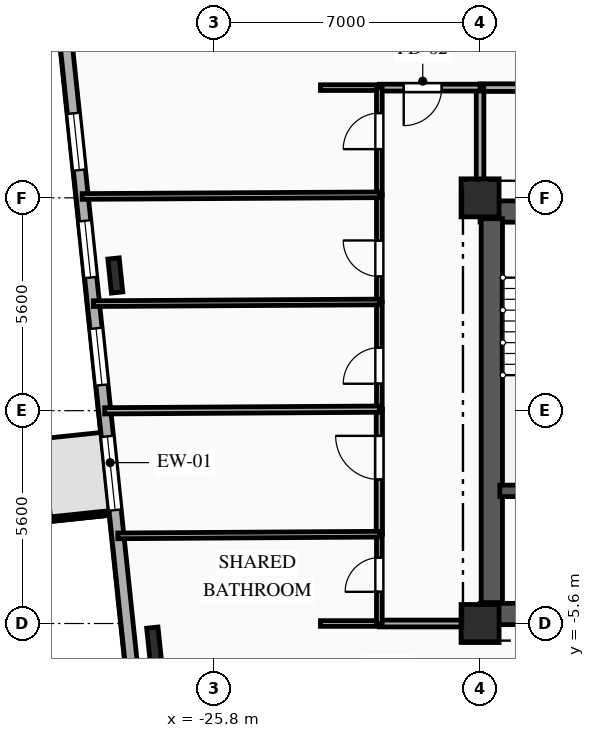
"""IFC4 building model, lengths in metres.
Left out: names, types, materials, properties, quantities, classifications, styles, units other than length and angle.
Written with IfcOpenShell. Run it as: python <this file> out.ifc"""

import sys

from ifc_helpers import new_model, si_unit, direction, frame, frame_2d, origin, origin_2d, place, context, subcontext, project, spatial, rectangle, i_section, extrude, element, fill, save


model = new_model("IFC4")
c1 = context("Model", 3, precision=1e-05, world=origin(), true_north=direction((0.0, 1.0)))
c2 = subcontext(c1, "Body", "Model", "MODEL_VIEW")
j1 = project(units=[si_unit("LENGTHUNIT", "METRE"), si_unit("PLANEANGLEUNIT", "RADIAN")], contexts=[c1])
p1 = place(None, origin())
s1 = spatial("IfcSite", under=j1, at=p1, CompositionType="ELEMENT")
p2 = place(p1, origin())
s2 = spatial("IfcBuilding", under=s1, at=p2, CompositionType="ELEMENT")
p3 = place(p2, frame((0.0, 0.0, 102.45)))
s3 = spatial("IfcBuildingStorey", under=s2, at=p3, CompositionType="ELEMENT", Elevation=102.45)
for number, where, z_axis, x_axis in (
    (1, (-18.8, -5.6, 0.0), (0.0, 0.0, 1.0), (1.0, 0.0, 0.0)),
    (2, (-18.8, 5.6, 0.0), (0.0, 0.0, 1.0), (1.0, 0.0, 0.0)),
):
    element("IfcColumn", number, at=place(p3, frame(where, z_axis=z_axis, x_axis=x_axis)), inside=s3, PredefinedType="COLUMN", context=c2, shape_type="SweptSolid", body=[
        extrude(rectangle(XDim=1.0, YDim=1.0, at=origin_2d()), origin(), (0.0, 0.0, 1.0), 3.35),
    ])
for number, where, z_axis, x_axis in (
    (3, (-28.398, 3.557, 0.0), (0.0, 0.0, 1.0), (0.995, 0.105, 0.0)),
    (4, (-27.377, -6.156, 0.0), (0.0, 0.0, 1.0), (0.995, 0.105, 0.0)),
):
    element("IfcColumn", number, at=place(p3, frame(where, z_axis=z_axis, x_axis=x_axis)), inside=s3, PredefinedType="COLUMN", context=c2, shape_type="SweptSolid", body=[
        extrude(i_section(OverallWidth=0.3, OverallDepth=0.9, WebThickness=0.019, FlangeThickness=0.035, FilletRadius=0.03, at=origin_2d()), origin(), (0.0, 0.0, 1.0), 3.35),
    ])
p4 = place(p3, frame((-26.935, -16.583, 0.0), z_axis=(0.0, 0.0, 1.0), x_axis=(-0.104524887486, 0.994522271192, 0.0)))
e5 = element("IfcWall", 5, at=p4, inside=s3, PredefinedType="SOLIDWALL", context=c2, shape_type="SweptSolid", body=[
    extrude(rectangle(XDim=30.6, YDim=0.32, at=frame_2d((15.3, 0.0))), origin(), (0.0, 0.0, 1.0), 3.045),
])
p5 = place(p4, frame((14.045, 0.0, 0.85)))
e6 = element("IfcOpeningElement", 6, at=p5, cuts=e5, PredefinedType="OPENING", context=c2, shape_type="SweptSolid", body=[
    extrude(rectangle(XDim=1.95, YDim=1.85, at=frame_2d((0.975, 0.925))), frame((0.0, 0.17, 0.0), z_axis=(0.0, -1.0, 0.0), x_axis=(1.0, 0.0, 0.0)), (0.0, 0.0, 1.0), 0.34),
])
p6 = place(p4, frame((17.354, 0.0, 0.85)))
e7 = element("IfcOpeningElement", 7, at=p6, cuts=e5, PredefinedType="OPENING", context=c2, shape_type="SweptSolid", body=[
    extrude(rectangle(XDim=1.5, YDim=1.85, at=frame_2d((0.75, 0.925))), frame((0.0, 0.17, 0.0), z_axis=(0.0, -1.0, 0.0), x_axis=(1.0, 0.0, 0.0)), (0.0, 0.0, 1.0), 0.34),
])
p7 = place(p4, frame((20.198, 0.0, 0.85)))
e8 = element("IfcOpeningElement", 8, at=p7, cuts=e5, PredefinedType="OPENING", context=c2, shape_type="SweptSolid", body=[
    extrude(rectangle(XDim=1.5, YDim=1.85, at=frame_2d((0.75, 0.925))), frame((0.0, 0.17, 0.0), z_axis=(0.0, -1.0, 0.0), x_axis=(1.0, 0.0, 0.0)), (0.0, 0.0, 1.0), 0.34),
])
p8 = place(p4, frame((23.041, 0.0, 0.85)))
e9 = element("IfcOpeningElement", 9, at=p8, cuts=e5, PredefinedType="OPENING", context=c2, shape_type="SweptSolid", body=[
    extrude(rectangle(XDim=1.5, YDim=1.85, at=frame_2d((0.75, 0.925))), frame((0.0, 0.17, 0.0), z_axis=(0.0, -1.0, 0.0), x_axis=(1.0, 0.0, 0.0)), (0.0, 0.0, 1.0), 0.34),
])
p9 = place(p3, frame((-18.8, 5.24, 0.0), z_axis=(0.0, 0.0, 1.0), x_axis=(1.0, 0.0, 0.0)))
e10 = element("IfcWall", 10, at=p9, inside=s3, PredefinedType="SHEAR", context=c2, shape_type="SweptSolid", body=[
    extrude(rectangle(XDim=9.6, YDim=0.56, at=frame_2d((4.8, 0.0))), origin(), (0.0, 0.0, 1.0), 3.045),
])
p10 = place(p9, frame((1.55, 0.0, 0.0)))
e11 = element("IfcOpeningElement", 11, at=p10, cuts=e10, PredefinedType="OPENING", context=c2, shape_type="SweptSolid", body=[
    extrude(rectangle(XDim=1.1, YDim=2.15, at=frame_2d((0.55, 1.075))), frame((0.0, 0.29, 0.0), z_axis=(0.0, -1.0, 0.0), x_axis=(1.0, 0.0, 0.0)), (0.0, 0.0, 1.0), 0.58),
])
p11 = place(p9, frame((4.775, 0.0, 0.0)))
e12 = element("IfcOpeningElement", 12, at=p11, cuts=e10, PredefinedType="OPENING", context=c2, shape_type="SweptSolid", body=[
    extrude(rectangle(XDim=1.05, YDim=2.1, at=frame_2d((0.525, 1.05))), frame((0.0, 0.29, 0.0), z_axis=(0.0, -1.0, 0.0), x_axis=(1.0, 0.0, 0.0)), (0.0, 0.0, 1.0), 0.58),
])
p12 = place(p3, frame((-18.8, -5.35, 0.0), z_axis=(0.0, 0.0, 1.0), x_axis=(1.0, 0.0, 0.0)))
e13 = element("IfcWall", 13, at=p12, inside=s3, PredefinedType="SHEAR", context=c2, shape_type="SweptSolid", body=[
    extrude(rectangle(XDim=9.6, YDim=0.56, at=frame_2d((4.8, 0.0))), origin(), (0.0, 0.0, 1.0), 3.045),
])
p13 = place(p12, frame((1.05, 0.0, 0.0)))
e14 = element("IfcOpeningElement", 14, at=p13, cuts=e13, PredefinedType="OPENING", context=c2, shape_type="SweptSolid", body=[
    extrude(rectangle(XDim=0.9, YDim=2.1, at=frame_2d((0.45, 1.05))), frame((0.0, 0.29, 0.0), z_axis=(0.0, -1.0, 0.0), x_axis=(1.0, 0.0, 0.0)), (0.0, 0.0, 1.0), 0.58),
])
p14 = place(p3, frame((-18.49, -5.05, 0.0), z_axis=(0.0, 0.0, 1.0), x_axis=(0.0, 1.0, 0.0)))
e15 = element("IfcWall", 15, at=p14, inside=s3, PredefinedType="SHEAR", context=c2, shape_type="SweptSolid", body=[
    extrude(rectangle(XDim=10.1, YDim=0.56, at=frame_2d((5.05, 0.0))), origin(), (0.0, 0.0, 1.0), 3.045),
])
p15 = place(p3, frame((-18.28, -2.11, 0.0), z_axis=(0.0, 0.0, 1.0), x_axis=(1.0, 0.0, 0.0)))
e16 = element("IfcWall", 16, at=p15, inside=s3, PredefinedType="SHEAR", context=c2, shape_type="SweptSolid", body=[
    extrude(rectangle(XDim=3.18, YDim=0.3, at=frame_2d((1.59, 0.0))), origin(), (0.0, 0.0, 1.0), 3.045),
])
p16 = place(p3, frame((-12.0, 8.5, 0.0), z_axis=(0.0, 0.0, 1.0), x_axis=(-1.0, 0.0, 0.0)))
e17 = element("IfcWall", 17, at=p16, inside=s3, PredefinedType="PARTITIONING", context=c2, shape_type="SweptSolid", body=[
    extrude(rectangle(XDim=6.8, YDim=0.2, at=frame_2d((3.4, 0.0))), origin(), (0.0, 0.0, 1.0), 3.045),
])
p17 = place(p16, frame((1.715, 0.0, 0.0)))
e18 = element("IfcOpeningElement", 18, at=p17, cuts=e17, PredefinedType="OPENING", context=c2, shape_type="SweptSolid", body=[
    extrude(rectangle(XDim=1.1, YDim=2.15, at=frame_2d((0.55, 1.075))), frame((0.0, 0.11, 0.0), z_axis=(0.0, -1.0, 0.0), x_axis=(1.0, 0.0, 0.0)), (0.0, 0.0, 1.0), 0.22),
])
p18 = place(p3, frame((-18.8, 8.5, 0.0), z_axis=(0.0, 0.0, 1.0), x_axis=(0.0, -1.0, 0.0)))
e19 = element("IfcWall", 19, at=p18, inside=s3, PredefinedType="PARTITIONING", context=c2, shape_type="SweptSolid", body=[
    extrude(rectangle(XDim=2.9, YDim=0.2, at=frame_2d((1.45, 0.0))), origin(), (0.0, 0.0, 1.0), 2.53),
])
p19 = place(p3, frame((-18.8, 8.5, 0.0), z_axis=(0.0, 0.0, 1.0), x_axis=(-1.0, 0.0, 0.0)))
e20 = element("IfcWall", 20, at=p19, inside=s3, PredefinedType="PARTITIONING", context=c2, shape_type="SweptSolid", body=[
    extrude(rectangle(XDim=2.65, YDim=0.18, at=frame_2d((1.325, 0.0))), origin(), (0.0, 0.0, 1.0), 3.045),
])
p20 = place(p19, frame((1.009, 0.0, 0.0)))
e21 = element("IfcOpeningElement", 21, at=p20, cuts=e20, PredefinedType="OPENING", context=c2, shape_type="SweptSolid", body=[
    extrude(rectangle(XDim=1.0, YDim=2.15, at=frame_2d((0.5, 1.075))), frame((0.0, 0.1, 0.0), z_axis=(0.0, -1.0, 0.0), x_axis=(1.0, 0.0, 0.0)), (0.0, 0.0, 1.0), 0.2),
])
p21 = place(p3, frame((-21.45, 8.5, 0.0), z_axis=(0.0, 0.0, 1.0), x_axis=(-1.0, 0.0, 0.0)))
e22 = element("IfcWall", 22, at=p21, inside=s3, PredefinedType="PARTITIONING", context=c2, shape_type="SweptSolid", body=[
    extrude(rectangle(XDim=1.55, YDim=0.15, at=frame_2d((0.775, 0.0))), origin(), (0.0, 0.0, 1.0), 3.045),
])
p22 = place(p3, frame((-21.45, -5.6, 0.0), z_axis=(0.0, 0.0, 1.0), x_axis=(1.0, 0.0, 0.0)))
e23 = element("IfcWall", 23, at=p22, inside=s3, PredefinedType="PARTITIONING", context=c2, shape_type="SweptSolid", body=[
    extrude(rectangle(XDim=2.65, YDim=0.18, at=frame_2d((1.325, 0.0))), origin(), (0.0, 0.0, 1.0), 3.045),
])
p23 = place(p3, frame((-23.0, -5.6, 0.0), z_axis=(0.0, 0.0, 1.0), x_axis=(1.0, 0.0, 0.0)))
e24 = element("IfcWall", 24, at=p23, inside=s3, PredefinedType="PLUMBINGWALL", context=c2, shape_type="SweptSolid", body=[
    extrude(rectangle(XDim=1.55, YDim=0.15, at=frame_2d((0.775, 0.0))), origin(), (0.0, 0.0, 1.0), 3.045),
])
p24 = place(p3, frame((-21.45, -5.6, 0.0), z_axis=(0.0, 0.0, 1.0), x_axis=(0.0, 1.0, 0.0)))
e25 = element("IfcWall", 25, at=p24, inside=s3, PredefinedType="PLUMBINGWALL", context=c2, shape_type="SweptSolid", body=[
    extrude(rectangle(XDim=2.35, YDim=0.15, at=frame_2d((1.175, 0.0))), origin(), (0.0, 0.0, 1.0), 3.045),
])
p25 = place(p24, frame((0.834, 0.0, 0.0)))
e26 = element("IfcOpeningElement", 26, at=p25, cuts=e25, PredefinedType="OPENING", context=c2, shape_type="SweptSolid", body=[
    extrude(rectangle(XDim=0.9, YDim=2.1, at=frame_2d((0.45, 1.05))), frame((0.0, 0.085, 0.0), z_axis=(0.0, -1.0, 0.0), x_axis=(1.0, 0.0, 0.0)), (0.0, 0.0, 1.0), 0.17),
])
p26 = place(p3, frame((-21.45, -3.25, 0.0), z_axis=(0.0, 0.0, 1.0), x_axis=(0.0, 1.0, 0.0)))
e27 = element("IfcWall", 27, at=p26, inside=s3, PredefinedType="PARTITIONING", context=c2, shape_type="SweptSolid", body=[
    extrude(rectangle(XDim=3.29, YDim=0.165, at=frame_2d((1.645, 0.0))), origin(), (0.0, 0.0, 1.0), 3.045),
])
p27 = place(p26, frame((1.438, 0.0, 0.0)))
e28 = element("IfcOpeningElement", 28, at=p27, cuts=e27, PredefinedType="OPENING", context=c2, shape_type="SweptSolid", body=[
    extrude(rectangle(XDim=1.15, YDim=2.15, at=frame_2d((0.575, 1.075))), frame((0.0, 0.093, 0.0), z_axis=(0.0, -1.0, 0.0), x_axis=(1.0, 0.0, 0.0)), (0.0, 0.0, 1.0), 0.185),
])
p28 = place(p3, frame((-21.45, 0.04, 0.0), z_axis=(0.0, 0.0, 1.0), x_axis=(0.0, 1.0, 0.0)))
e29 = element("IfcWall", 29, at=p28, inside=s3, PredefinedType="PARTITIONING", context=c2, shape_type="SweptSolid", body=[
    extrude(rectangle(XDim=2.82, YDim=0.15, at=frame_2d((1.41, 0.0))), origin(), (0.0, 0.0, 1.0), 3.045),
])
p29 = place(p28, frame((0.669, 0.0, 0.0)))
e30 = element("IfcOpeningElement", 30, at=p29, cuts=e29, PredefinedType="OPENING", context=c2, shape_type="SweptSolid", body=[
    extrude(rectangle(XDim=0.95, YDim=2.1, at=frame_2d((0.475, 1.05))), frame((0.0, 0.085, 0.0), z_axis=(0.0, -1.0, 0.0), x_axis=(1.0, 0.0, 0.0)), (0.0, 0.0, 1.0), 0.17),
])
p30 = place(p3, frame((-21.45, 2.86, 0.0), z_axis=(0.0, 0.0, 1.0), x_axis=(0.0, 1.0, 0.0)))
e31 = element("IfcWall", 31, at=p30, inside=s3, PredefinedType="PARTITIONING", context=c2, shape_type="SweptSolid", body=[
    extrude(rectangle(XDim=2.82, YDim=0.15, at=frame_2d((1.41, 0.0))), origin(), (0.0, 0.0, 1.0), 3.045),
])
p31 = place(p30, frame((0.669, 0.0, 0.0)))
e32 = element("IfcOpeningElement", 32, at=p31, cuts=e31, PredefinedType="OPENING", context=c2, shape_type="SweptSolid", body=[
    extrude(rectangle(XDim=0.95, YDim=2.1, at=frame_2d((0.475, 1.05))), frame((0.0, 0.085, 0.0), z_axis=(0.0, -1.0, 0.0), x_axis=(1.0, 0.0, 0.0)), (0.0, 0.0, 1.0), 0.17),
])
p32 = place(p3, frame((-21.45, 5.68, 0.0), z_axis=(0.0, 0.0, 1.0), x_axis=(0.0, 1.0, 0.0)))
e33 = element("IfcWall", 33, at=p32, inside=s3, PredefinedType="PARTITIONING", context=c2, shape_type="SweptSolid", body=[
    extrude(rectangle(XDim=2.82, YDim=0.15, at=frame_2d((1.41, 0.0))), origin(), (0.0, 0.0, 1.0), 3.045),
])
p33 = place(p32, frame((1.201, 0.0, 0.0)))
e34 = element("IfcOpeningElement", 34, at=p33, cuts=e33, PredefinedType="OPENING", context=c2, shape_type="SweptSolid", body=[
    extrude(rectangle(XDim=0.95, YDim=2.1, at=frame_2d((0.475, 1.05))), frame((0.0, 0.085, 0.0), z_axis=(0.0, -1.0, 0.0), x_axis=(1.0, 0.0, 0.0)), (0.0, 0.0, 1.0), 0.17),
])
p34 = place(p3, frame((-28.332, -3.294, 0.0), z_axis=(0.0, 0.0, 1.0), x_axis=(0.99997961062, 0.006385792383, 0.0)))
e35 = element("IfcWall", 35, at=p34, inside=s3, PredefinedType="PLUMBINGWALL", context=c2, shape_type="SweptSolid", body=[
    extrude(rectangle(XDim=6.882, YDim=0.15, at=frame_2d((3.441, 0.0))), origin(), (0.0, 0.0, 1.0), 3.045),
])
p35 = place(p3, frame((-28.677, -0.004, 0.0), z_axis=(0.0, 0.0, 1.0), x_axis=(0.999981514486, 0.006080352417, 0.0)))
e36 = element("IfcWall", 36, at=p35, inside=s3, PredefinedType="PARTITIONING", context=c2, shape_type="SweptSolid", body=[
    extrude(rectangle(XDim=7.228, YDim=0.165, at=frame_2d((3.614, 0.0))), origin(), (0.0, 0.0, 1.0), 3.045),
])
p36 = place(p3, frame((-28.974, 2.816, 0.0), z_axis=(0.0, 0.0, 1.0), x_axis=(0.999982942193, 0.00584083232, 0.0)))
e37 = element("IfcWall", 37, at=p36, inside=s3, PredefinedType="PARTITIONING", context=c2, shape_type="SweptSolid", body=[
    extrude(rectangle(XDim=7.524, YDim=0.15, at=frame_2d((3.762, 0.0))), origin(), (0.0, 0.0, 1.0), 2.53),
])
p37 = place(p3, frame((-29.27, 5.636, 0.0), z_axis=(0.0, 0.0, 1.0), x_axis=(0.999984210669, 0.005619467326, 0.0)))
e38 = element("IfcWall", 38, at=p37, inside=s3, PredefinedType="PARTITIONING", context=c2, shape_type="SweptSolid", body=[
    extrude(rectangle(XDim=7.82, YDim=0.15, at=frame_2d((3.91, 0.0))), origin(), (0.0, 0.0, 1.0), 3.045),
])
p38 = place(p5, origin())
e39 = element("IfcWindow", 39, at=p38, inside=s3, PartitioningType="SINGLE_PANEL", PredefinedType="WINDOW", context=c2, shape_type="SweptSolid", body=[
    extrude(rectangle(XDim=1.95, YDim=1.85, at=frame_2d((0.975, 0.925))), frame((0.0, 0.03, 0.0), z_axis=(0.0, -1.0, 0.0), x_axis=(1.0, 0.0, 0.0)), (0.0, 0.0, 1.0), 0.06),
])
fill(e6, e39)
p39 = place(p6, origin())
e40 = element("IfcWindow", 40, at=p39, inside=s3, PartitioningType="SINGLE_PANEL", PredefinedType="WINDOW", context=c2, shape_type="SweptSolid", body=[
    extrude(rectangle(XDim=1.5, YDim=1.85, at=frame_2d((0.75, 0.925))), frame((0.0, 0.03, 0.0), z_axis=(0.0, -1.0, 0.0), x_axis=(1.0, 0.0, 0.0)), (0.0, 0.0, 1.0), 0.06),
])
fill(e7, e40)
p40 = place(p7, origin())
e41 = element("IfcWindow", 41, at=p40, inside=s3, PartitioningType="SINGLE_PANEL", PredefinedType="WINDOW", context=c2, shape_type="SweptSolid", body=[
    extrude(rectangle(XDim=1.5, YDim=1.85, at=frame_2d((0.75, 0.925))), frame((0.0, 0.03, 0.0), z_axis=(0.0, -1.0, 0.0), x_axis=(1.0, 0.0, 0.0)), (0.0, 0.0, 1.0), 0.06),
])
fill(e8, e41)
p41 = place(p8, origin())
e42 = element("IfcWindow", 42, at=p41, inside=s3, PartitioningType="SINGLE_PANEL", PredefinedType="WINDOW", context=c2, shape_type="SweptSolid", body=[
    extrude(rectangle(XDim=1.5, YDim=1.85, at=frame_2d((0.75, 0.925))), frame((0.0, 0.03, 0.0), z_axis=(0.0, -1.0, 0.0), x_axis=(1.0, 0.0, 0.0)), (0.0, 0.0, 1.0), 0.06),
])
fill(e9, e42)
p42 = place(p20, origin())
e43 = element("IfcDoor", 43, at=p42, inside=s3, OperationType="SINGLE_SWING_RIGHT", PredefinedType="DOOR", context=c2, shape_type="SweptSolid", body=[
    extrude(rectangle(XDim=1.0, YDim=2.15, at=frame_2d((0.5, 1.075))), frame((0.0, 0.025, 0.0), z_axis=(0.0, -1.0, 0.0), x_axis=(1.0, 0.0, 0.0)), (0.0, 0.0, 1.0), 0.05),
])
fill(e21, e43)
p43 = place(p25, origin())
e44 = element("IfcDoor", 44, at=p43, inside=s3, OperationType="SINGLE_SWING_LEFT", PredefinedType="DOOR", context=c2, shape_type="SweptSolid", body=[
    extrude(rectangle(XDim=0.9, YDim=2.1, at=frame_2d((0.45, 1.05))), frame((0.0, 0.025, 0.0), z_axis=(0.0, -1.0, 0.0), x_axis=(1.0, 0.0, 0.0)), (0.0, 0.0, 1.0), 0.05),
])
fill(e26, e44)
p44 = place(p27, origin())
e45 = element("IfcDoor", 45, at=p44, inside=s3, OperationType="SINGLE_SWING_RIGHT", PredefinedType="DOOR", context=c2, shape_type="SweptSolid", body=[
    extrude(rectangle(XDim=1.15, YDim=2.15, at=frame_2d((0.575, 1.075))), frame((0.0, 0.025, 0.0), z_axis=(0.0, -1.0, 0.0), x_axis=(1.0, 0.0, 0.0)), (0.0, 0.0, 1.0), 0.05),
])
fill(e28, e45)
p45 = place(p29, origin())
e46 = element("IfcDoor", 46, at=p45, inside=s3, OperationType="SINGLE_SWING_LEFT", PredefinedType="DOOR", context=c2, shape_type="SweptSolid", body=[
    extrude(rectangle(XDim=0.95, YDim=2.1, at=frame_2d((0.475, 1.05))), frame((0.0, 0.025, 0.0), z_axis=(0.0, -1.0, 0.0), x_axis=(1.0, 0.0, 0.0)), (0.0, 0.0, 1.0), 0.05),
])
fill(e30, e46)
p46 = place(p31, origin())
e47 = element("IfcDoor", 47, at=p46, inside=s3, OperationType="SINGLE_SWING_RIGHT", PredefinedType="DOOR", context=c2, shape_type="SweptSolid", body=[
    extrude(rectangle(XDim=0.95, YDim=2.1, at=frame_2d((0.475, 1.05))), frame((0.0, 0.025, 0.0), z_axis=(0.0, -1.0, 0.0), x_axis=(1.0, 0.0, 0.0)), (0.0, 0.0, 1.0), 0.05),
])
fill(e32, e47)
p47 = place(p33, origin())
e48 = element("IfcDoor", 48, at=p47, inside=s3, OperationType="SINGLE_SWING_LEFT", PredefinedType="DOOR", context=c2, shape_type="SweptSolid", body=[
    extrude(rectangle(XDim=0.95, YDim=2.1, at=frame_2d((0.475, 1.05))), frame((0.0, 0.025, 0.0), z_axis=(0.0, -1.0, 0.0), x_axis=(1.0, 0.0, 0.0)), (0.0, 0.0, 1.0), 0.05),
])
fill(e34, e48)
save(model, sys.argv[1])
